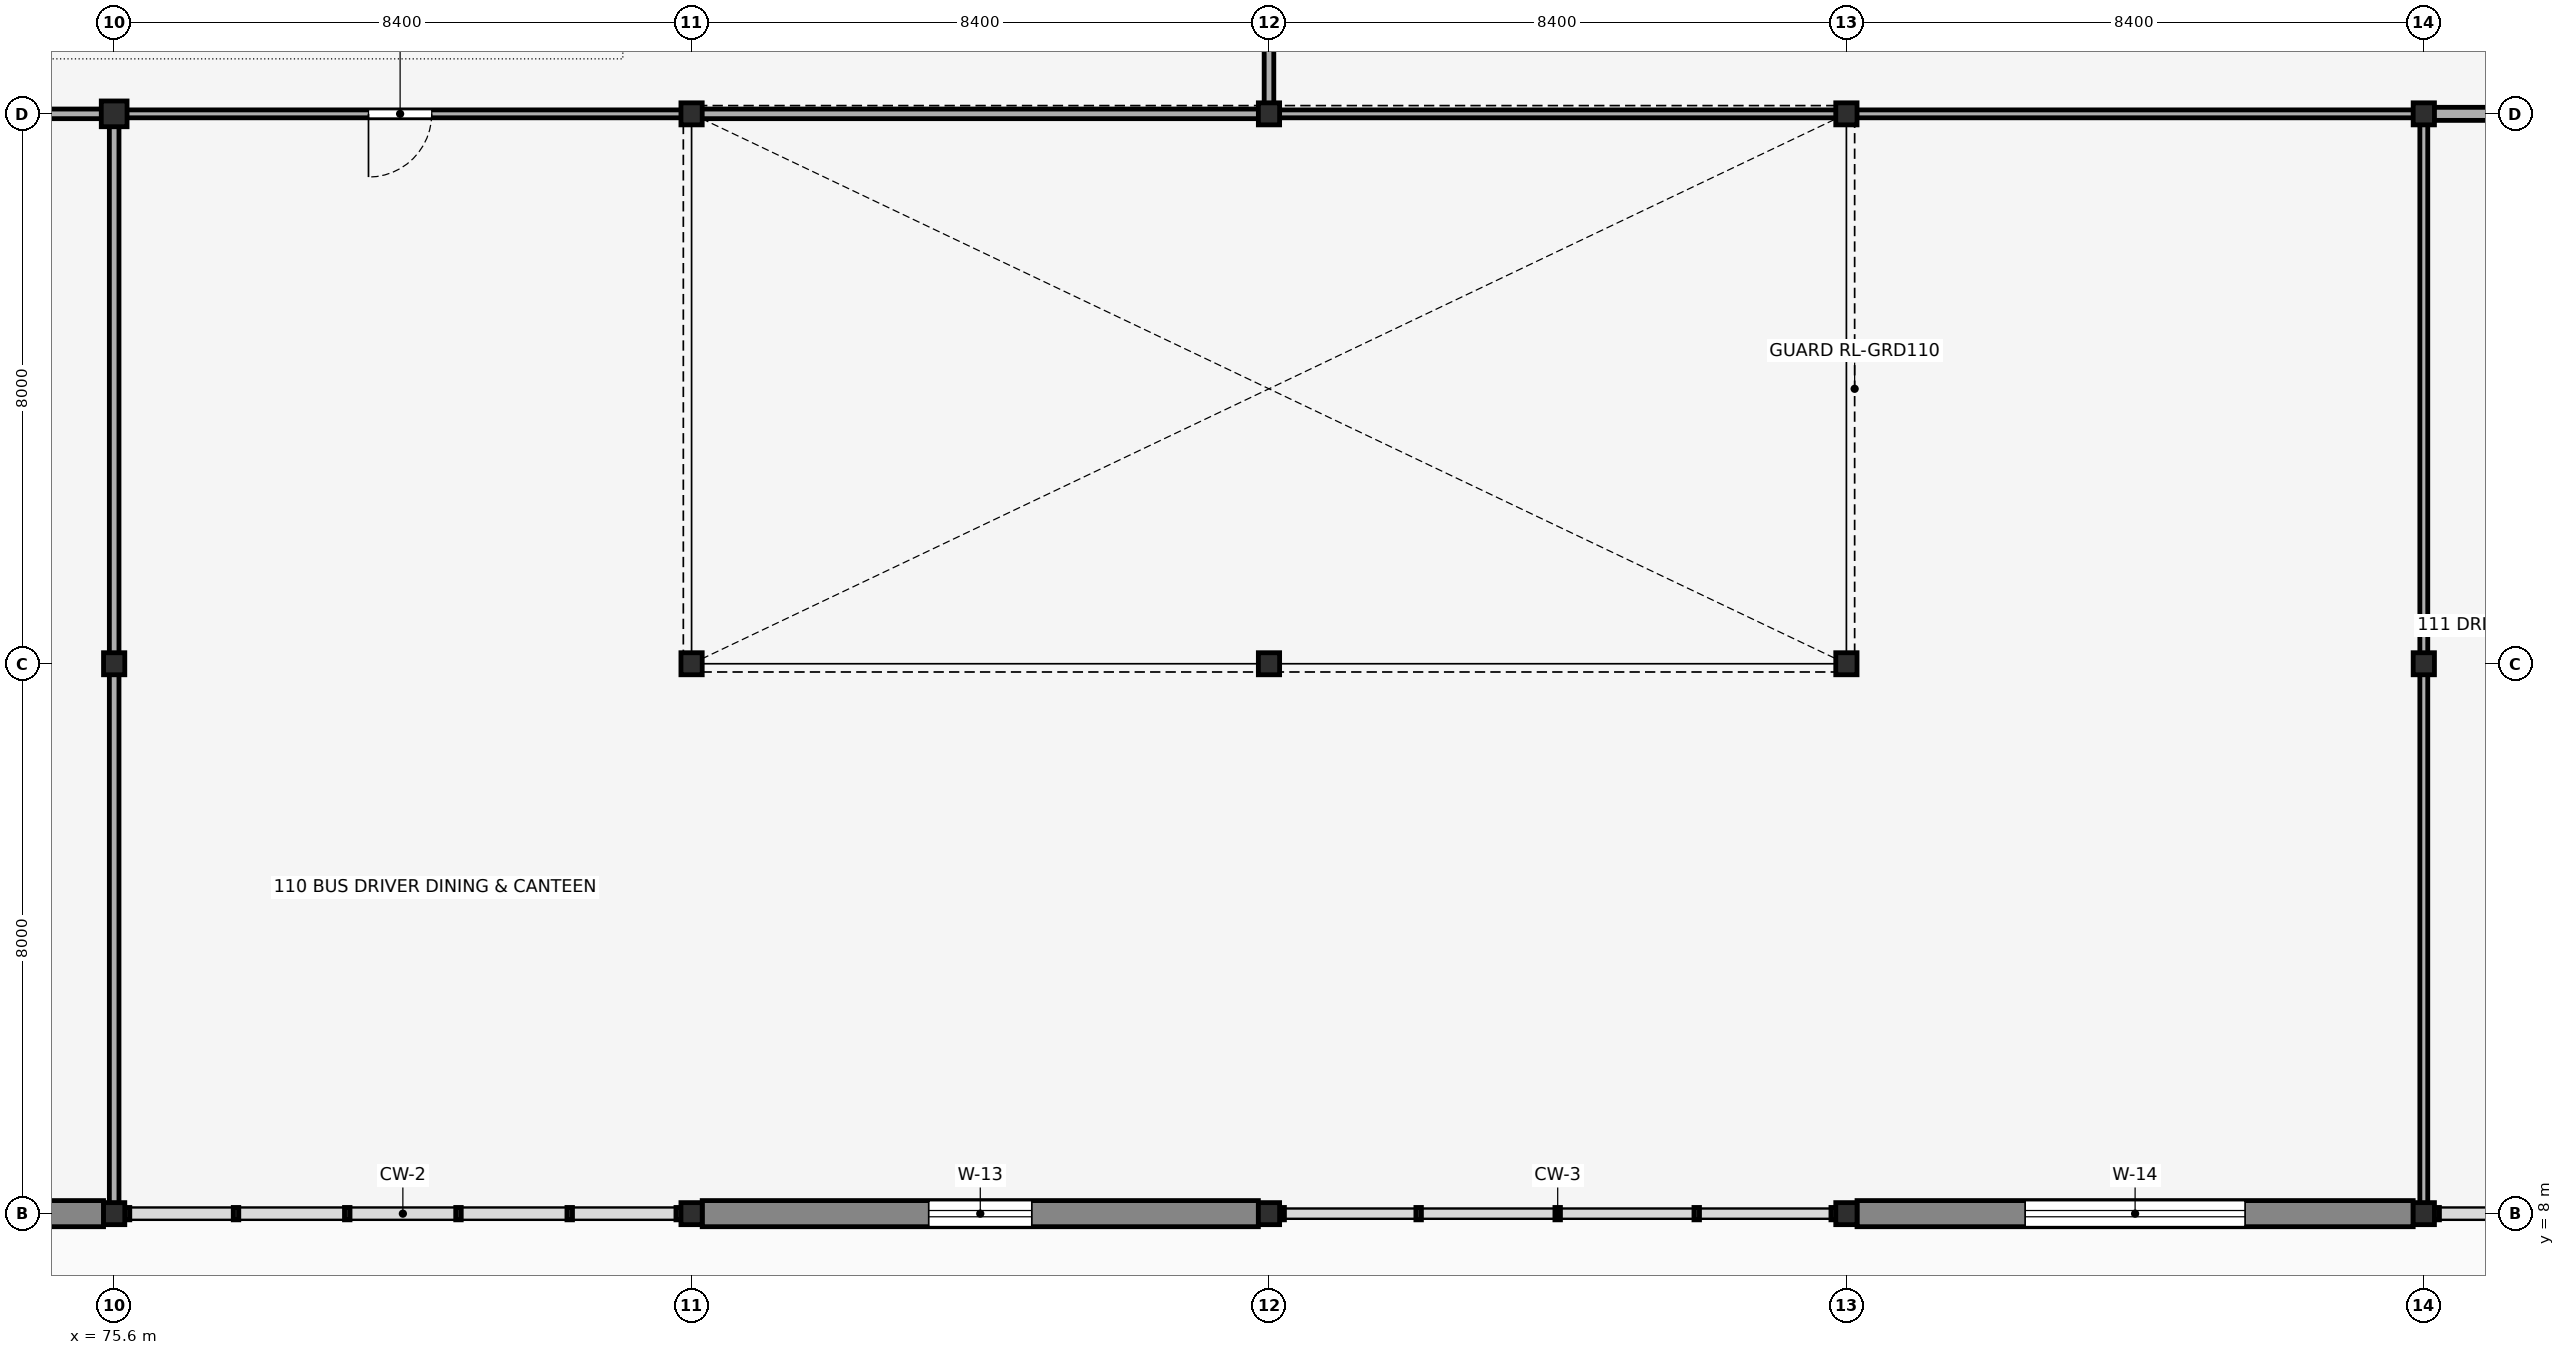
"""IFC4 building model, lengths in metres.
Left out: names, types, materials, properties, quantities, classifications, styles, units other than length and angle.
Written with IfcOpenShell. Run it as: python <this file> out.ifc"""

import sys

from ifc_helpers import new_model, si_unit, direction, frame, frame_2d, origin, origin_2d, place, context, subcontext, project, spatial, rectangle, i_section, extrude, element, fill, save


model = new_model("IFC4")
c1 = context("Model", 3, precision=1e-05, world=origin(), true_north=direction((0.0, 1.0)))
c2 = subcontext(c1, "Body", "Model", "MODEL_VIEW")
j1 = project(units=[si_unit("LENGTHUNIT", "METRE"), si_unit("PLANEANGLEUNIT", "RADIAN")], contexts=[c1])
p1 = place(None, origin())
s1 = spatial("IfcSite", under=j1, at=p1, CompositionType="ELEMENT")
p2 = place(p1, origin())
s2 = spatial("IfcBuilding", under=s1, at=p2, CompositionType="ELEMENT")
p3 = place(p2, frame((0.0, 0.0, 5.44)))
s3 = spatial("IfcBuildingStorey", under=s2, at=p3, CompositionType="ELEMENT", Elevation=5.44)
for number, where, z_axis, x_axis in (
    (1, (75.6, 8.0, 0.0), (0.0, 0.0, 1.0), (1.0, 0.0, 0.0)),
    (2, (75.6, 16.0, 0.0), (0.0, 0.0, 1.0), (1.0, 0.0, 0.0)),
):
    element("IfcColumn", number, at=place(p3, frame(where, z_axis=z_axis, x_axis=x_axis)), inside=s3, PredefinedType="COLUMN", context=c2, shape_type="SweptSolid", body=[
        extrude(i_section(OverallWidth=0.309, OverallDepth=0.321, WebThickness=0.014, FlangeThickness=0.022, FilletRadius=0.015, at=origin_2d()), origin(), (0.0, 0.0, 1.0), 3.8),
    ])
p4 = place(p3, frame((75.6, 24.0, 0.0), z_axis=(0.0, 0.0, 1.0), x_axis=(1.0, 0.0, 0.0)))
e3 = element("IfcColumn", 3, at=p4, inside=s3, PredefinedType="COLUMN", context=c2, shape_type="SweptSolid", body=[
    extrude(i_section(OverallWidth=0.375, OverallDepth=0.375, WebThickness=0.017, FlangeThickness=0.027, FilletRadius=0.015, at=origin_2d()), origin(), (0.0, 0.0, 1.0), 3.8),
])
for number, where, z_axis, x_axis in (
    (4, (84.0, 8.0, 0.0), (0.0, 0.0, 1.0), (1.0, 0.0, 0.0)),
    (5, (84.0, 16.0, 0.0), (0.0, 0.0, 1.0), (1.0, 0.0, 0.0)),
    (6, (84.0, 24.0, 0.0), (0.0, 0.0, 1.0), (1.0, 0.0, 0.0)),
    (7, (92.4, 8.0, 0.0), (0.0, 0.0, 1.0), (1.0, 0.0, 0.0)),
    (8, (92.4, 16.0, 0.0), (0.0, 0.0, 1.0), (1.0, 0.0, 0.0)),
    (9, (92.4, 24.0, 0.0), (0.0, 0.0, 1.0), (1.0, 0.0, 0.0)),
    (10, (100.8, 8.0, 0.0), (0.0, 0.0, 1.0), (1.0, 0.0, 0.0)),
    (11, (100.8, 16.0, 0.0), (0.0, 0.0, 1.0), (1.0, 0.0, 0.0)),
    (12, (100.8, 24.0, 0.0), (0.0, 0.0, 1.0), (1.0, 0.0, 0.0)),
    (13, (109.2, 8.0, 0.0), (0.0, 0.0, 1.0), (1.0, 0.0, 0.0)),
    (14, (109.2, 16.0, 0.0), (0.0, 0.0, 1.0), (1.0, 0.0, 0.0)),
    (15, (109.2, 24.0, 0.0), (0.0, 0.0, 1.0), (1.0, 0.0, 0.0)),
):
    element("IfcColumn", number, at=place(p3, frame(where, z_axis=z_axis, x_axis=x_axis)), inside=s3, PredefinedType="COLUMN", context=c2, shape_type="SweptSolid", body=[
        extrude(i_section(OverallWidth=0.309, OverallDepth=0.321, WebThickness=0.014, FlangeThickness=0.022, FilletRadius=0.015, at=origin_2d()), origin(), (0.0, 0.0, 1.0), 3.8),
    ])
p5 = place(p3, frame((67.354, 8.0, 0.0), z_axis=(0.0, 0.0, 1.0), x_axis=(1.0, 0.0, 0.0)))
e16 = element("IfcWall", 16, at=p5, inside=s3, PredefinedType="SOLIDWALL", context=c2, shape_type="SweptSolid", body=[
    extrude(rectangle(XDim=8.091, YDim=0.38, at=frame_2d((4.045, 0.0))), origin(), (0.0, 0.0, 1.0), 3.45),
])
p6 = place(p5, frame((3.146, 0.0, 0.9), z_axis=(0.0, 0.0, 1.0), x_axis=(1.0, 0.0, 0.0)))
e17 = element("IfcOpeningElement", 17, at=p6, cuts=e16, PredefinedType="OPENING", context=c2, shape_type="SweptSolid", body=[
    extrude(rectangle(XDim=1.8, YDim=1.3, at=frame_2d((0.9, 0.65))), frame((0.0, 0.2, 0.0), z_axis=(0.0, -1.0, 0.0), x_axis=(1.0, 0.0, 0.0)), (0.0, 0.0, 1.0), 0.4),
])
p7 = place(p3, frame((84.155, 8.0, 0.0), z_axis=(0.0, 0.0, 1.0), x_axis=(1.0, 0.0, 0.0)))
e18 = element("IfcWall", 18, at=p7, inside=s3, PredefinedType="SOLIDWALL", context=c2, shape_type="SweptSolid", body=[
    extrude(rectangle(XDim=8.091, YDim=0.38, at=frame_2d((4.045, 0.0))), origin(), (0.0, 0.0, 1.0), 3.45),
])
p8 = place(p7, frame((3.295, 0.0, 0.9), z_axis=(0.0, 0.0, 1.0), x_axis=(1.0, 0.0, 0.0)))
e19 = element("IfcOpeningElement", 19, at=p8, cuts=e18, PredefinedType="OPENING", context=c2, shape_type="SweptSolid", body=[
    extrude(rectangle(XDim=1.5, YDim=1.4, at=frame_2d((0.75, 0.7))), frame((0.0, 0.2, 0.0), z_axis=(0.0, -1.0, 0.0), x_axis=(1.0, 0.0, 0.0)), (0.0, 0.0, 1.0), 0.4),
])
p9 = place(p3, frame((100.955, 8.0, 0.0), z_axis=(0.0, 0.0, 1.0), x_axis=(1.0, 0.0, 0.0)))
e20 = element("IfcWall", 20, at=p9, inside=s3, PredefinedType="SOLIDWALL", context=c2, shape_type="SweptSolid", body=[
    extrude(rectangle(XDim=8.091, YDim=0.38, at=frame_2d((4.045, 0.0))), origin(), (0.0, 0.0, 1.0), 3.45),
])
p10 = place(p9, frame((2.445, 0.0, 1.55), z_axis=(0.0, 0.0, 1.0), x_axis=(1.0, 0.0, 0.0)))
e21 = element("IfcOpeningElement", 21, at=p10, cuts=e20, PredefinedType="OPENING", context=c2, shape_type="SweptSolid", body=[
    extrude(rectangle(XDim=3.2, YDim=0.9, at=frame_2d((1.6, 0.45))), frame((0.0, 0.2, 0.0), z_axis=(0.0, -1.0, 0.0), x_axis=(1.0, 0.0, 0.0)), (0.0, 0.0, 1.0), 0.4),
])
p11 = place(p3, frame((75.777, 24.0, 0.0), z_axis=(0.0, 0.0, 1.0), x_axis=(1.0, 0.0, 0.0)))
e22 = element("IfcWall", 22, at=p11, inside=s3, PredefinedType="PARTITIONING", context=c2, shape_type="SweptSolid", body=[
    extrude(rectangle(XDim=8.078, YDim=0.115, at=frame_2d((4.039, 0.0))), origin(), (0.0, 0.0, 1.0), 3.26),
])
p12 = place(p11, frame((4.443, 0.0, 0.0), z_axis=(0.0, 0.0, 1.0), x_axis=(-1.0, 0.0, 0.0)))
e23 = element("IfcOpeningElement", 23, at=p12, cuts=e22, PredefinedType="OPENING", context=c2, shape_type="SweptSolid", body=[
    extrude(rectangle(XDim=0.92, YDim=2.12, at=frame_2d((0.46, 1.06))), frame((0.0, 0.067, 0.0), z_axis=(0.0, -1.0, 0.0), x_axis=(1.0, 0.0, 0.0)), (0.0, 0.0, 1.0), 0.135),
])
p13 = place(p3, frame((109.344, 24.0, 0.0), z_axis=(0.0, 0.0, 1.0), x_axis=(1.0, 0.0, 0.0)))
e24 = element("IfcWall", 24, at=p13, inside=s3, PredefinedType="PLUMBINGWALL", context=c2, shape_type="SweptSolid", body=[
    extrude(rectangle(XDim=8.111, YDim=0.19, at=frame_2d((4.055, 0.0))), origin(), (0.0, 0.0, 1.0), 3.26),
])
p14 = place(p13, frame((4.505, 0.0, 0.0), z_axis=(0.0, 0.0, 1.0), x_axis=(-1.0, 0.0, 0.0)))
e25 = element("IfcOpeningElement", 25, at=p14, cuts=e24, PredefinedType="OPENING", context=c2, shape_type="SweptSolid", body=[
    extrude(rectangle(XDim=0.95, YDim=2.15, at=frame_2d((0.475, 1.075))), frame((0.0, 0.105, 0.0), z_axis=(0.0, -1.0, 0.0), x_axis=(1.0, 0.0, 0.0)), (0.0, 0.0, 1.0), 0.21),
])
p15 = place(p3, frame((67.377, 24.0, 0.0), z_axis=(0.0, 0.0, 1.0), x_axis=(1.0, 0.0, 0.0)))
e26 = element("IfcWall", 26, at=p15, inside=s3, PredefinedType="PARTITIONING", context=c2, shape_type="SweptSolid", body=[
    extrude(rectangle(XDim=8.045, YDim=0.14, at=frame_2d((4.023, 0.0))), origin(), (0.0, 0.0, 1.0), 3.26),
])
p16 = place(p3, frame((84.145, 24.0, 0.0), z_axis=(0.0, 0.0, 1.0), x_axis=(1.0, 0.0, 0.0)))
e27 = element("IfcWall", 27, at=p16, inside=s3, PredefinedType="PARTITIONING", context=c2, shape_type="SweptSolid", body=[
    extrude(rectangle(XDim=8.111, YDim=0.14, at=frame_2d((4.055, 0.0))), origin(), (0.0, 0.0, 1.0), 3.26),
])
p17 = place(p3, frame((92.4, 24.15, 0.0), z_axis=(0.0, 0.0, 1.0), x_axis=(0.0, 1.0, 0.0)))
e28 = element("IfcWall", 28, at=p17, inside=s3, PredefinedType="PARTITIONING", context=c2, shape_type="SweptSolid", body=[
    extrude(rectangle(XDim=7.699, YDim=0.14, at=frame_2d((3.85, 0.0))), origin(), (0.0, 0.0, 1.0), 3.337),
])
for number, where, z_axis, x_axis in (
    (29, (92.545, 24.0, 0.0), (0.0, 0.0, 1.0), (1.0, 0.0, 0.0)),
    (30, (100.945, 24.0, 0.0), (0.0, 0.0, 1.0), (1.0, 0.0, 0.0)),
):
    element("IfcWall", number, at=place(p3, frame(where, z_axis=z_axis, x_axis=x_axis)), inside=s3, PredefinedType="PARTITIONING", context=c2, shape_type="SweptSolid", body=[
        extrude(rectangle(XDim=8.111, YDim=0.115, at=frame_2d((4.055, 0.0))), origin(), (0.0, 0.0, 1.0), 3.26),
    ])
p18 = place(p3, frame((75.6, 8.15, 0.0), z_axis=(0.0, 0.0, 1.0), x_axis=(0.0, 1.0, 0.0)))
e31 = element("IfcWall", 31, at=p18, inside=s3, PredefinedType="PARTITIONING", context=c2, shape_type="SweptSolid", body=[
    extrude(rectangle(XDim=7.699, YDim=0.14, at=frame_2d((3.85, 0.0))), origin(), (0.0, 0.0, 1.0), 3.337),
])
p19 = place(p3, frame((75.6, 16.15, 0.0), z_axis=(0.0, 0.0, 1.0), x_axis=(0.0, 1.0, 0.0)))
e32 = element("IfcWall", 32, at=p19, inside=s3, PredefinedType="PARTITIONING", context=c2, shape_type="SweptSolid", body=[
    extrude(rectangle(XDim=7.672, YDim=0.14, at=frame_2d((3.836, 0.0))), origin(), (0.0, 0.0, 1.0), 3.337),
])
for number, where, z_axis, x_axis in (
    (33, (109.2, 8.15, 0.0), (0.0, 0.0, 1.0), (0.0, 1.0, 0.0)),
    (34, (109.2, 16.15, 0.0), (0.0, 0.0, 1.0), (0.0, 1.0, 0.0)),
):
    element("IfcWall", number, at=place(p3, frame(where, z_axis=z_axis, x_axis=x_axis)), inside=s3, PredefinedType="PARTITIONING", context=c2, shape_type="SweptSolid", body=[
        extrude(rectangle(XDim=7.699, YDim=0.115, at=frame_2d((3.85, 0.0))), origin(), (0.0, 0.0, 1.0), 3.337),
    ])
p20 = place(p8, origin())
e35 = element("IfcWindow", 35, at=p20, inside=s3, PartitioningType="SINGLE_PANEL", PredefinedType="WINDOW", context=c2, shape_type="SweptSolid", body=[
    extrude(rectangle(XDim=1.5, YDim=1.4, at=frame_2d((0.75, 0.7))), frame((0.0, 0.03, 0.0), z_axis=(0.0, -1.0, 0.0), x_axis=(1.0, 0.0, 0.0)), (0.0, 0.0, 1.0), 0.06),
])
fill(e19, e35)
p21 = place(p10, origin())
e36 = element("IfcWindow", 36, at=p21, inside=s3, PartitioningType="TRIPLE_PANEL_HORIZONTAL", PredefinedType="WINDOW", context=c2, shape_type="SweptSolid", body=[
    extrude(rectangle(XDim=3.2, YDim=0.9, at=frame_2d((1.6, 0.45))), frame((0.0, 0.03, 0.0), z_axis=(0.0, -1.0, 0.0), x_axis=(1.0, 0.0, 0.0)), (0.0, 0.0, 1.0), 0.06),
])
fill(e21, e36)
p22 = place(p12, origin())
e37 = element("IfcDoor", 37, at=p22, inside=s3, OperationType="SINGLE_SWING_RIGHT", PredefinedType="DOOR", context=c2, shape_type="SweptSolid", body=[
    extrude(rectangle(XDim=0.92, YDim=2.12, at=frame_2d((0.46, 1.06))), frame((0.0, 0.025, 0.0), z_axis=(0.0, -1.0, 0.0), x_axis=(1.0, 0.0, 0.0)), (0.0, 0.0, 1.0), 0.05),
])
fill(e23, e37)
save(model, sys.argv[1])
